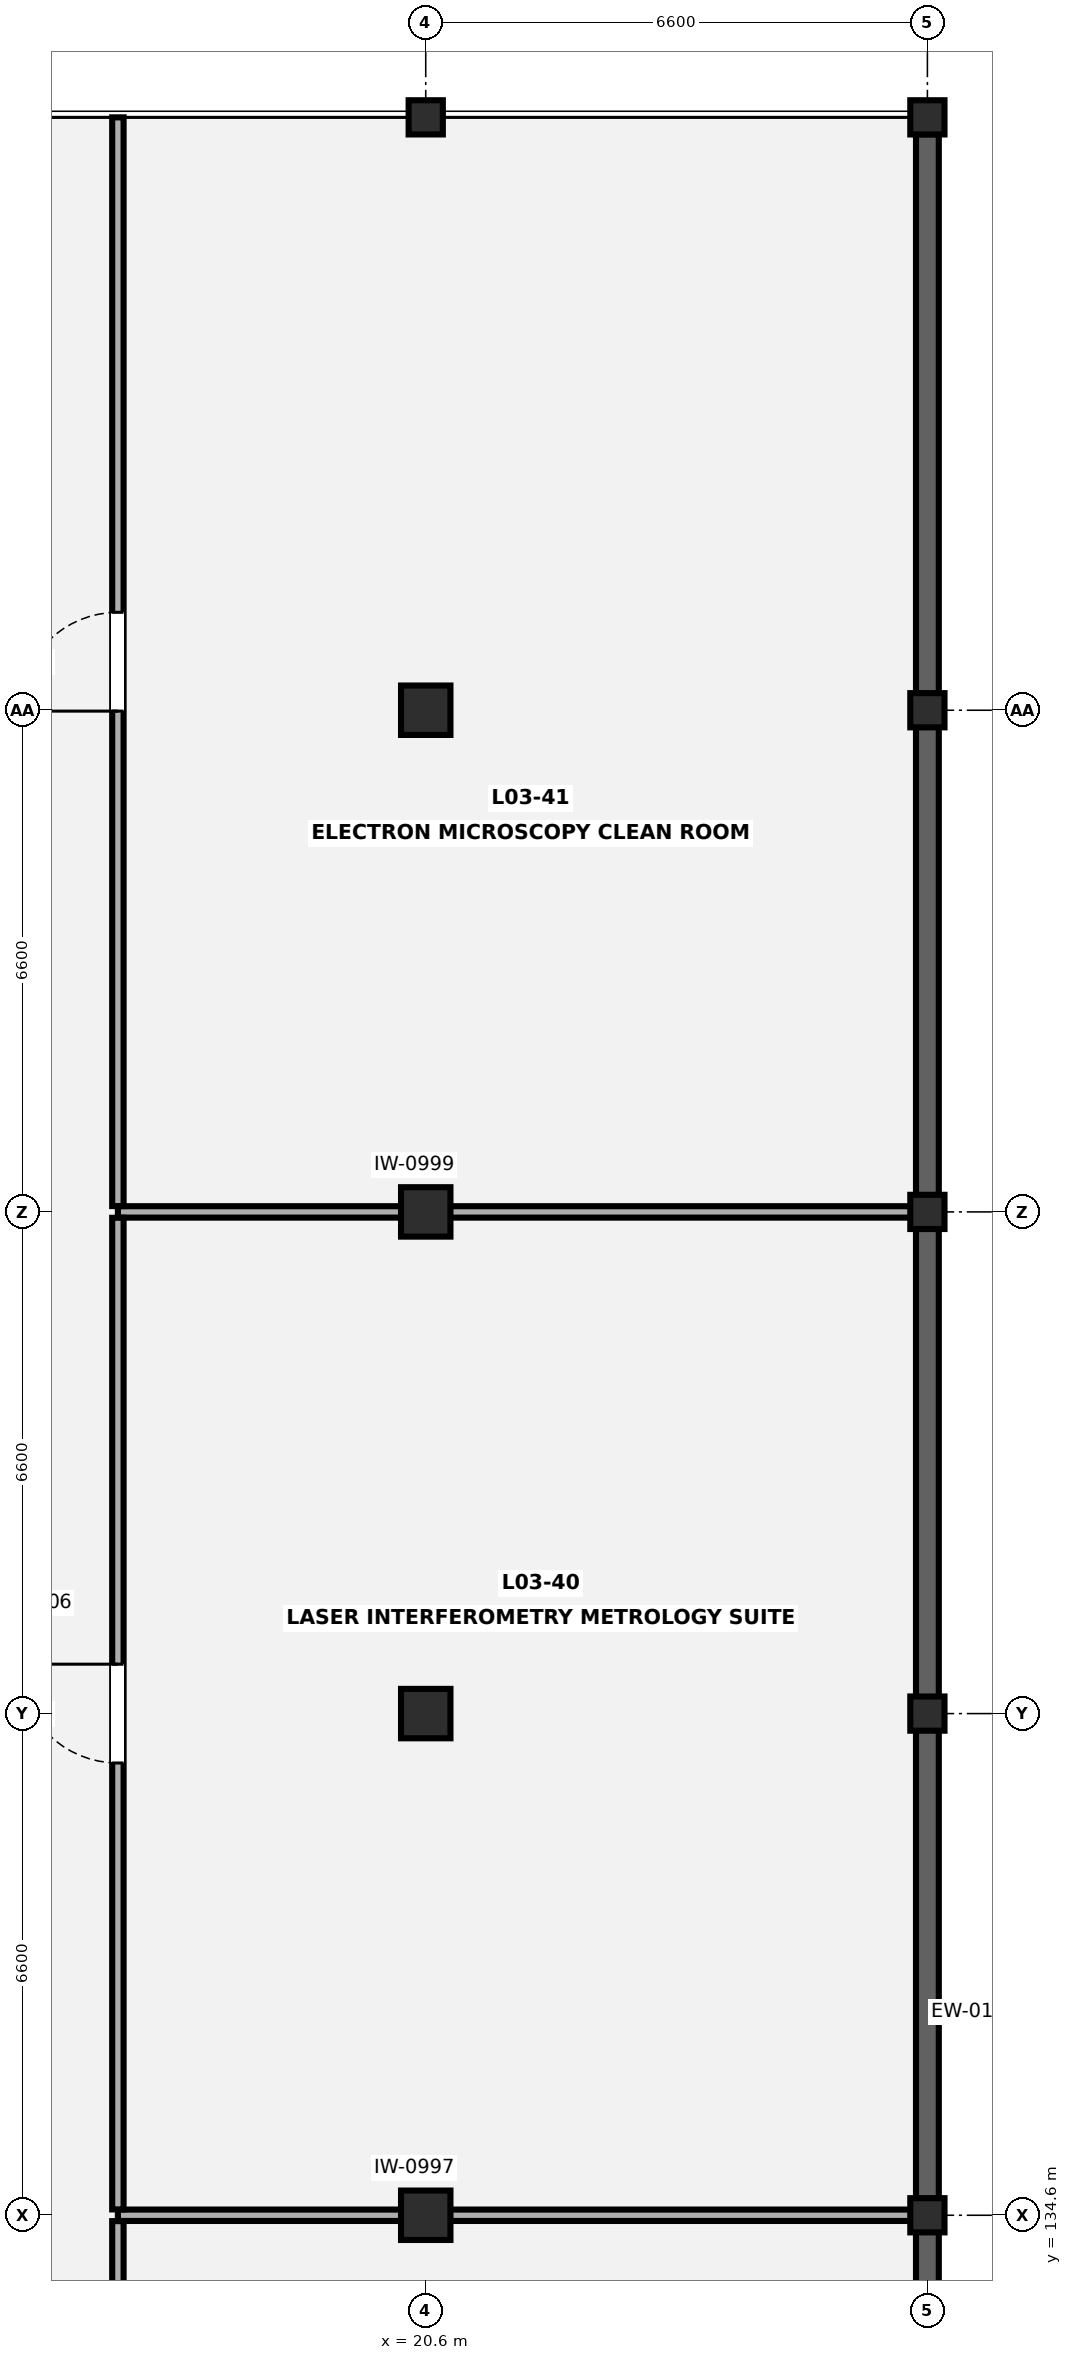
"""IFC4 building model, lengths in metres.
Left out: names, types, materials, properties, quantities, classifications, styles, units other than length and angle.
Written with IfcOpenShell. Run it as: python <this file> out.ifc"""

import sys

from ifc_helpers import new_model, si_unit, direction, frame, frame_2d, origin, origin_2d, place, context, subcontext, project, spatial, rectangle, extrude, element, fill, save


model = new_model("IFC4")
c1 = context("Model", 3, precision=1e-05, world=origin(), true_north=direction((0.0, 1.0)))
c2 = subcontext(c1, "Body", "Model", "MODEL_VIEW")
j1 = project(units=[si_unit("LENGTHUNIT", "METRE"), si_unit("PLANEANGLEUNIT", "RADIAN")], contexts=[c1])
p1 = place(None, origin())
s1 = spatial("IfcSite", under=j1, at=p1, CompositionType="ELEMENT")
p2 = place(p1, origin())
s2 = spatial("IfcBuilding", under=s1, at=p2, CompositionType="ELEMENT")
p3 = place(p2, frame((0.0, 0.0, 13.3)))
s3 = spatial("IfcBuildingStorey", under=s2, at=p3, CompositionType="ELEMENT", Elevation=13.3)
for number, where, z_axis, x_axis in (
    (1, (20.6, 134.6, 0.0), (0.0, 0.0, 1.0), (1.0, 0.0, 0.0)),
    (2, (20.6, 141.2, 0.0), (0.0, 0.0, 1.0), (1.0, 0.0, 0.0)),
    (3, (20.6, 147.8, 0.0), (0.0, 0.0, 1.0), (1.0, 0.0, 0.0)),
):
    element("IfcColumn", number, at=place(p3, frame(where, z_axis=z_axis, x_axis=x_axis)), inside=s3, PredefinedType="COLUMN", context=c2, shape_type="SweptSolid", body=[
        extrude(rectangle(XDim=0.65, YDim=0.65, at=origin_2d()), origin(), (0.0, 0.0, 1.0), 4.2),
    ])
p4 = place(p3, frame((20.6, 154.4, 0.0), z_axis=(0.0, 0.0, 1.0), x_axis=(1.0, 0.0, 0.0)))
e4 = element("IfcColumn", 4, at=p4, inside=s3, PredefinedType="COLUMN", context=c2, shape_type="SweptSolid", body=[
    extrude(rectangle(XDim=0.65, YDim=0.65, at=origin_2d()), origin(), (0.0, 0.0, 1.0), 3.92),
])
p5 = place(p3, frame((20.6, 162.2, 0.0), z_axis=(0.0, 0.0, 1.0), x_axis=(1.0, 0.0, 0.0)))
e5 = element("IfcColumn", 5, at=p5, inside=s3, PredefinedType="PILASTER", context=c2, shape_type="SweptSolid", body=[
    extrude(rectangle(XDim=0.45, YDim=0.45, at=origin_2d()), origin(), (0.0, 0.0, 1.0), 3.92),
])
for number, where, z_axis, x_axis in (
    (6, (27.2, 134.6, 0.0), (0.0, 0.0, 1.0), (1.0, 0.0, 0.0)),
    (7, (27.2, 141.2, 0.0), (0.0, 0.0, 1.0), (1.0, 0.0, 0.0)),
    (8, (27.2, 147.8, 0.0), (0.0, 0.0, 1.0), (1.0, 0.0, 0.0)),
):
    element("IfcColumn", number, at=place(p3, frame(where, z_axis=z_axis, x_axis=x_axis)), inside=s3, PredefinedType="PILASTER", context=c2, shape_type="SweptSolid", body=[
        extrude(rectangle(XDim=0.45, YDim=0.45, at=origin_2d()), origin(), (0.0, 0.0, 1.0), 4.2),
    ])
for number, where, z_axis, x_axis in (
    (9, (27.2, 154.4, 0.0), (0.0, 0.0, 1.0), (1.0, 0.0, 0.0)),
    (10, (27.2, 162.2, 0.0), (0.0, 0.0, 1.0), (1.0, 0.0, 0.0)),
):
    element("IfcColumn", number, at=place(p3, frame(where, z_axis=z_axis, x_axis=x_axis)), inside=s3, PredefinedType="PILASTER", context=c2, shape_type="SweptSolid", body=[
        extrude(rectangle(XDim=0.45, YDim=0.45, at=origin_2d()), origin(), (0.0, 0.0, 1.0), 3.92),
    ])
p6 = place(p3, frame((27.2, 161.977, 0.0), z_axis=(0.0, 0.0, 1.0), x_axis=(0.0, -1.0, 0.0)))
e11 = element("IfcWall", 11, at=p6, inside=s3, PredefinedType="SOLIDWALL", context=c2, shape_type="SweptSolid", body=[
    extrude(rectangle(XDim=66.754, YDim=0.3, at=frame_2d((33.377, 0.0))), origin(), (0.0, 0.0, 1.0), 3.84),
])
p7 = place(p3, frame((16.55, 134.6, 0.0), z_axis=(0.0, 0.0, 1.0), x_axis=(1.0, 0.0, 0.0)))
e12 = element("IfcWall", 12, at=p7, inside=s3, PredefinedType="PARTITIONING", context=c2, shape_type="SweptSolid", body=[
    extrude(rectangle(XDim=10.538, YDim=0.15, at=frame_2d((5.269, 0.0))), origin(), (0.0, 0.0, 1.0), 2.435),
])
p8 = place(p3, frame((16.55, 121.477, 0.0), z_axis=(0.0, 0.0, 1.0), x_axis=(0.0, 1.0, 0.0)))
e13 = element("IfcWall", 13, at=p8, inside=s3, PredefinedType="PARTITIONING", context=c2, shape_type="SweptSolid", body=[
    extrude(rectangle(XDim=13.046, YDim=0.15, at=frame_2d((6.523, 0.0))), origin(), (0.0, 0.0, 1.0), 3.85),
])
p9 = place(p8, frame((5.873, 0.0, 0.0)))
e14 = element("IfcOpeningElement", 14, at=p9, cuts=e13, PredefinedType="OPENING", context=c2, shape_type="SweptSolid", body=[
    extrude(rectangle(XDim=1.3, YDim=2.2, at=frame_2d((0.65, 1.1))), frame((0.0, 0.085, 0.0), z_axis=(0.0, -1.0, 0.0), x_axis=(1.0, 0.0, 0.0)), (0.0, 0.0, 1.0), 0.17),
])
p10 = place(p3, frame((16.55, 147.8, 0.0), z_axis=(0.0, 0.0, 1.0), x_axis=(1.0, 0.0, 0.0)))
e15 = element("IfcWall", 15, at=p10, inside=s3, PredefinedType="PARTITIONING", context=c2, shape_type="SweptSolid", body=[
    extrude(rectangle(XDim=10.538, YDim=0.15, at=frame_2d((5.269, 0.0))), origin(), (0.0, 0.0, 1.0), 2.435),
])
p11 = place(p3, frame((16.55, 134.677, 0.0), z_axis=(0.0, 0.0, 1.0), x_axis=(0.0, 1.0, 0.0)))
e16 = element("IfcWall", 16, at=p11, inside=s3, PredefinedType="PARTITIONING", context=c2, shape_type="SweptSolid", body=[
    extrude(rectangle(XDim=13.046, YDim=0.15, at=frame_2d((6.523, 0.0))), origin(), (0.0, 0.0, 1.0), 3.85),
])
p12 = place(p11, frame((5.873, 0.0, 0.0)))
e17 = element("IfcOpeningElement", 17, at=p12, cuts=e16, PredefinedType="OPENING", context=c2, shape_type="SweptSolid", body=[
    extrude(rectangle(XDim=1.3, YDim=2.2, at=frame_2d((0.65, 1.1))), frame((0.0, 0.085, 0.0), z_axis=(0.0, -1.0, 0.0), x_axis=(1.0, 0.0, 0.0)), (0.0, 0.0, 1.0), 0.17),
])
p13 = place(p3, frame((16.55, 147.877, 0.0), z_axis=(0.0, 0.0, 1.0), x_axis=(0.0, 1.0, 0.0)))
e18 = element("IfcWall", 18, at=p13, inside=s3, PredefinedType="PARTITIONING", context=c2, shape_type="SweptSolid", body=[
    extrude(rectangle(XDim=14.323, YDim=0.15, at=frame_2d((7.162, 0.0))), origin(), (0.0, 0.0, 1.0), 3.85),
])
p14 = place(p13, frame((6.511, 0.0, 0.0)))
e19 = element("IfcOpeningElement", 19, at=p14, cuts=e18, PredefinedType="OPENING", context=c2, shape_type="SweptSolid", body=[
    extrude(rectangle(XDim=1.3, YDim=2.2, at=frame_2d((0.65, 1.1))), frame((0.0, 0.085, 0.0), z_axis=(0.0, -1.0, 0.0), x_axis=(1.0, 0.0, 0.0)), (0.0, 0.0, 1.0), 0.17),
])
p15 = place(p12, origin())
e20 = element("IfcDoor", 20, at=p15, inside=s3, OperationType="SINGLE_SWING_RIGHT", PredefinedType="DOOR", context=c2, shape_type="SweptSolid", body=[
    extrude(rectangle(XDim=1.3, YDim=2.2, at=frame_2d((0.65, 1.1))), frame((0.0, 0.025, 0.0), z_axis=(0.0, -1.0, 0.0), x_axis=(1.0, 0.0, 0.0)), (0.0, 0.0, 1.0), 0.05),
])
fill(e17, e20)
p16 = place(p14, origin())
e21 = element("IfcDoor", 21, at=p16, inside=s3, OperationType="SINGLE_SWING_LEFT", PredefinedType="DOOR", context=c2, shape_type="SweptSolid", body=[
    extrude(rectangle(XDim=1.3, YDim=2.2, at=frame_2d((0.65, 1.1))), frame((0.0, 0.025, 0.0), z_axis=(0.0, -1.0, 0.0), x_axis=(1.0, 0.0, 0.0)), (0.0, 0.0, 1.0), 0.05),
])
fill(e19, e21)
save(model, sys.argv[1])
